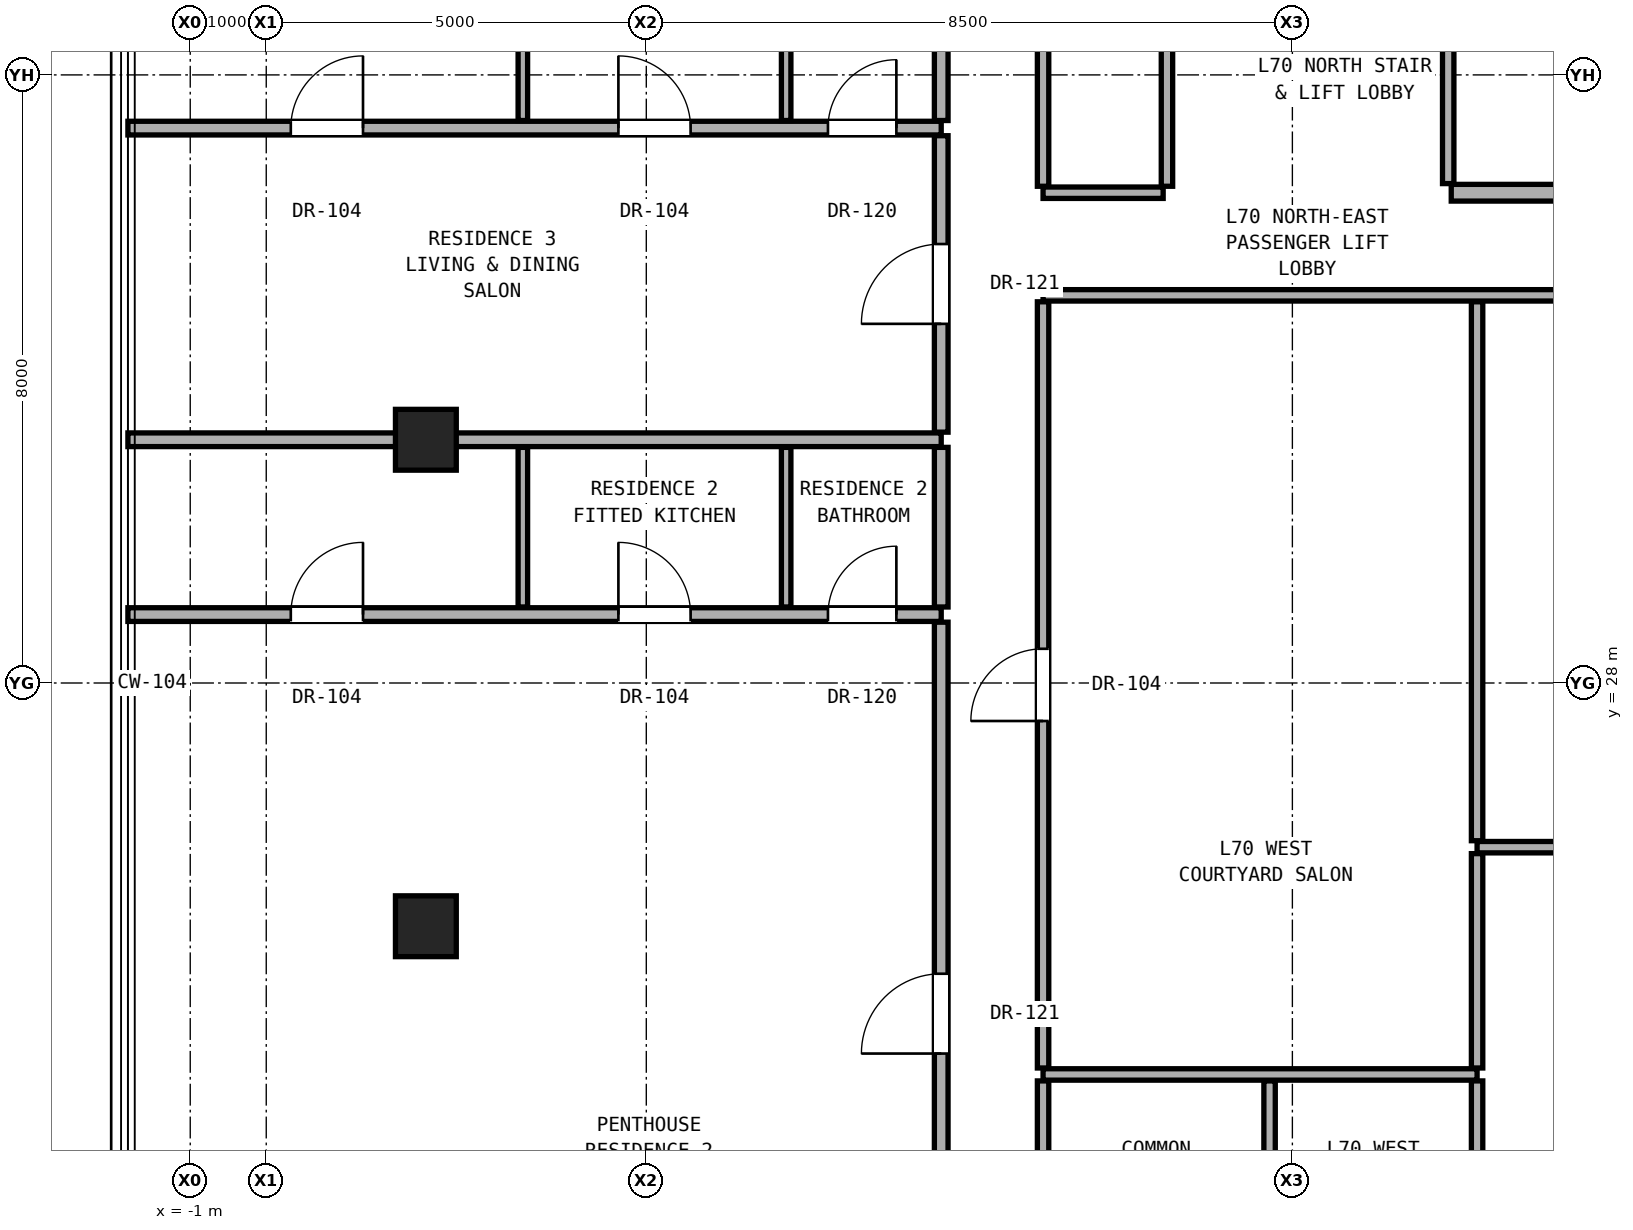
"""IFC4 building model, lengths in metres.
Left out: names, types, materials, properties, quantities, classifications, styles, units other than length and angle.
Written with IfcOpenShell. Run it as: python <this file> out.ifc"""

import sys

from ifc_helpers import new_model, si_unit, direction, frame, frame_2d, origin, origin_2d, place, context, subcontext, project, spatial, rectangle, hollow_rectangle, extrude, element, fill, save


model = new_model("IFC4")
c1 = context("Model", 3, precision=1e-05, world=origin(), true_north=direction((0.0, 1.0)))
c2 = subcontext(c1, "Body", "Model", "MODEL_VIEW")
j1 = project(units=[si_unit("LENGTHUNIT", "METRE"), si_unit("PLANEANGLEUNIT", "RADIAN")], contexts=[c1])
p1 = place(None, origin())
s1 = spatial("IfcSite", under=j1, at=p1, CompositionType="ELEMENT")
p2 = place(p1, origin())
s2 = spatial("IfcBuilding", under=s1, at=p2, CompositionType="ELEMENT")
p3 = place(p2, frame((0.0, 0.0, 245.8)))
s3 = spatial("IfcBuildingStorey", under=s2, at=p3, CompositionType="ELEMENT", Elevation=245.8)
for number, where, z_axis, x_axis in (
    (1, (2.1, 24.8, 0.0), (0.0, 0.0, 1.0), (1.0, 0.0, 0.0)),
    (2, (2.1, 31.2, 0.0), (0.0, 0.0, 1.0), (1.0, 0.0, 0.0)),
):
    element("IfcColumn", number, at=place(p3, frame(where, z_axis=z_axis, x_axis=x_axis)), inside=s3, PredefinedType="COLUMN", context=c2, shape_type="SweptSolid", body=[
        extrude(hollow_rectangle(XDim=0.8, YDim=0.8, WallThickness=0.045, at=origin_2d()), origin(), (0.0, 0.0, 1.0), 3.3),
    ])
p4 = place(p3, frame((10.22, 22.85, 0.0), z_axis=(0.0, 0.0, 1.0), x_axis=(1.0, 0.0, 0.0)))
e3 = element("IfcWall", 3, at=p4, inside=s3, PredefinedType="PARTITIONING", context=c2, shape_type="SweptSolid", body=[
    extrude(rectangle(XDim=5.71, YDim=0.15, at=frame_2d((2.855, 0.0))), origin(), (0.0, 0.0, 1.0), 2.236),
])
p5 = place(p3, frame((15.93, 25.84, 0.0), z_axis=(0.0, 0.0, 1.0), x_axis=(1.0, 0.0, 0.0)))
e4 = element("IfcWall", 4, at=p5, inside=s3, PredefinedType="PARTITIONING", context=c2, shape_type="SweptSolid", body=[
    extrude(rectangle(XDim=14.85, YDim=0.15, at=frame_2d((7.425, 0.0))), origin(), (0.0, 0.0, 1.0), 2.236),
])
p6 = place(p3, frame((-1.82, 28.9, 0.0), z_axis=(0.0, 0.0, 1.0), x_axis=(1.0, 0.0, 0.0)))
e5 = element("IfcWall", 5, at=p6, inside=s3, PredefinedType="PARTITIONING", context=c2, shape_type="SweptSolid", body=[
    extrude(rectangle(XDim=10.7, YDim=0.18, at=frame_2d((5.35, 0.0))), origin(), (0.0, 0.0, 1.0), 2.319),
])
p7 = place(p6, frame((2.143, 0.0, 0.0)))
e6 = element("IfcOpeningElement", 6, at=p7, cuts=e5, PredefinedType="OPENING", context=c2, shape_type="SweptSolid", body=[
    extrude(rectangle(XDim=0.95, YDim=2.15, at=frame_2d((0.475, 1.075))), frame((0.0, 0.1, 0.0), z_axis=(0.0, -1.0, 0.0), x_axis=(1.0, 0.0, 0.0)), (0.0, 0.0, 1.0), 0.2),
])
p8 = place(p6, frame((6.453, 0.0, 0.0)))
e7 = element("IfcOpeningElement", 7, at=p8, cuts=e5, PredefinedType="OPENING", context=c2, shape_type="SweptSolid", body=[
    extrude(rectangle(XDim=0.95, YDim=2.15, at=frame_2d((0.475, 1.075))), frame((0.0, 0.1, 0.0), z_axis=(0.0, -1.0, 0.0), x_axis=(1.0, 0.0, 0.0)), (0.0, 0.0, 1.0), 0.2),
])
p9 = place(p6, frame((9.21, 0.0, 0.0)))
e8 = element("IfcOpeningElement", 8, at=p9, cuts=e5, PredefinedType="OPENING", context=c2, shape_type="SweptSolid", body=[
    extrude(rectangle(XDim=0.9, YDim=2.1, at=frame_2d((0.45, 1.05))), frame((0.0, 0.1, 0.0), z_axis=(0.0, -1.0, 0.0), x_axis=(1.0, 0.0, 0.0)), (0.0, 0.0, 1.0), 0.2),
])
p10 = place(p3, frame((-1.82, 31.2, 0.0), z_axis=(0.0, 0.0, 1.0), x_axis=(1.0, 0.0, 0.0)))
e9 = element("IfcWall", 9, at=p10, inside=s3, PredefinedType="PARTITIONING", context=c2, shape_type="SweptSolid", body=[
    extrude(rectangle(XDim=10.7, YDim=0.18, at=frame_2d((5.35, 0.0))), origin(), (0.0, 0.0, 1.0), 2.319),
])
p11 = place(p3, frame((10.22, 33.1, 0.0), z_axis=(0.0, 0.0, 1.0), x_axis=(1.0, 0.0, 0.0)))
e10 = element("IfcWall", 10, at=p11, inside=s3, PredefinedType="PARTITIONING", context=c2, shape_type="SweptSolid", body=[
    extrude(rectangle(XDim=20.56, YDim=0.15, at=frame_2d((10.28, 0.0))), origin(), (0.0, 0.0, 1.0), 2.236),
])
p12 = place(p11, frame((9.343, 0.0, 0.0)))
e11 = element("IfcOpeningElement", 11, at=p12, cuts=e10, PredefinedType="OPENING", context=c2, shape_type="SweptSolid", body=[
    extrude(rectangle(XDim=1.05, YDim=2.2, at=frame_2d((0.525, 1.1))), frame((0.0, 0.085, 0.0), z_axis=(0.0, -1.0, 0.0), x_axis=(1.0, 0.0, 0.0)), (0.0, 0.0, 1.0), 0.17),
])
p13 = place(p11, frame((16.748, 0.0, 0.0)))
e12 = element("IfcOpeningElement", 12, at=p13, cuts=e10, PredefinedType="OPENING", context=c2, shape_type="SweptSolid", body=[
    extrude(rectangle(XDim=1.05, YDim=2.2, at=frame_2d((0.525, 1.1))), frame((0.0, 0.085, 0.0), z_axis=(0.0, -1.0, 0.0), x_axis=(1.0, 0.0, 0.0)), (0.0, 0.0, 1.0), 0.17),
])
p14 = place(p3, frame((10.22, 34.45, 0.0), z_axis=(0.0, 0.0, 1.0), x_axis=(1.0, 0.0, 0.0)))
e13 = element("IfcWall", 13, at=p14, inside=s3, PredefinedType="PARTITIONING", context=c2, shape_type="SweptSolid", body=[
    extrude(rectangle(XDim=1.58, YDim=0.15, at=frame_2d((0.79, 0.0))), origin(), (0.0, 0.0, 1.0), 2.236),
])
p15 = place(p3, frame((15.59, 34.45, 0.0), z_axis=(0.0, 0.0, 1.0), x_axis=(1.0, 0.0, 0.0)))
e14 = element("IfcWall", 14, at=p15, inside=s3, PredefinedType="SOLIDWALL", context=c2, shape_type="SweptSolid", body=[
    extrude(rectangle(XDim=15.19, YDim=0.22, at=frame_2d((7.595, 0.0))), origin(), (0.0, 0.0, 1.0), 2.236),
])
p16 = place(p15, frame((6.435, 0.0, 0.0)))
e15 = element("IfcOpeningElement", 15, at=p16, cuts=e14, PredefinedType="OPENING", context=c2, shape_type="SweptSolid", body=[
    extrude(rectangle(XDim=0.85, YDim=2.01, at=frame_2d((0.425, 1.005))), frame((0.0, 0.12, 0.0), z_axis=(0.0, -1.0, 0.0), x_axis=(1.0, 0.0, 0.0)), (0.0, 0.0, 1.0), 0.24),
])
p17 = place(p15, frame((11.085, 0.0, 0.0)))
e16 = element("IfcOpeningElement", 16, at=p17, cuts=e14, PredefinedType="OPENING", context=c2, shape_type="SweptSolid", body=[
    extrude(rectangle(XDim=0.95, YDim=2.15, at=frame_2d((0.475, 1.075))), frame((0.0, 0.12, 0.0), z_axis=(0.0, -1.0, 0.0), x_axis=(1.0, 0.0, 0.0)), (0.0, 0.0, 1.0), 0.24),
])
p18 = place(p15, frame((1.775, 0.0, 0.0)))
e17 = element("IfcOpeningElement", 17, at=p18, cuts=e14, PredefinedType="OPENING", context=c2, shape_type="SweptSolid", body=[
    extrude(rectangle(XDim=0.85, YDim=2.01, at=frame_2d((0.425, 1.005))), frame((0.0, 0.12, 0.0), z_axis=(0.0, -1.0, 0.0), x_axis=(1.0, 0.0, 0.0)), (0.0, 0.0, 1.0), 0.24),
])
p19 = place(p3, frame((-1.82, 35.3, 0.0), z_axis=(0.0, 0.0, 1.0), x_axis=(1.0, 0.0, 0.0)))
e18 = element("IfcWall", 18, at=p19, inside=s3, PredefinedType="PARTITIONING", context=c2, shape_type="SweptSolid", body=[
    extrude(rectangle(XDim=10.7, YDim=0.18, at=frame_2d((5.35, 0.0))), origin(), (0.0, 0.0, 1.0), 2.319),
])
p20 = place(p19, frame((2.143, 0.0, 0.0)))
e19 = element("IfcOpeningElement", 19, at=p20, cuts=e18, PredefinedType="OPENING", context=c2, shape_type="SweptSolid", body=[
    extrude(rectangle(XDim=0.95, YDim=2.15, at=frame_2d((0.475, 1.075))), frame((0.0, 0.1, 0.0), z_axis=(0.0, -1.0, 0.0), x_axis=(1.0, 0.0, 0.0)), (0.0, 0.0, 1.0), 0.2),
])
p21 = place(p19, frame((6.453, 0.0, 0.0)))
e20 = element("IfcOpeningElement", 20, at=p21, cuts=e18, PredefinedType="OPENING", context=c2, shape_type="SweptSolid", body=[
    extrude(rectangle(XDim=0.95, YDim=2.15, at=frame_2d((0.475, 1.075))), frame((0.0, 0.1, 0.0), z_axis=(0.0, -1.0, 0.0), x_axis=(1.0, 0.0, 0.0)), (0.0, 0.0, 1.0), 0.2),
])
p22 = place(p19, frame((9.21, 0.0, 0.0)))
e21 = element("IfcOpeningElement", 21, at=p22, cuts=e18, PredefinedType="OPENING", context=c2, shape_type="SweptSolid", body=[
    extrude(rectangle(XDim=0.9, YDim=2.1, at=frame_2d((0.45, 1.05))), frame((0.0, 0.1, 0.0), z_axis=(0.0, -1.0, 0.0), x_axis=(1.0, 0.0, 0.0)), (0.0, 0.0, 1.0), 0.2),
])
p23 = place(p3, frame((3.376, 29.0, 0.0), z_axis=(0.0, 0.0, 1.0), x_axis=(0.0, 1.0, 0.0)))
e22 = element("IfcWall", 22, at=p23, inside=s3, PredefinedType="PARTITIONING", context=c2, shape_type="SweptSolid", body=[
    extrude(rectangle(XDim=2.1, YDim=0.125, at=frame_2d((1.05, 0.0))), origin(), (0.0, 0.0, 1.0), 2.396),
])
p24 = place(p3, frame((3.376, 35.4, 0.0), z_axis=(0.0, 0.0, 1.0), x_axis=(0.0, 1.0, 0.0)))
e23 = element("IfcWall", 23, at=p24, inside=s3, PredefinedType="PARTITIONING", context=c2, shape_type="SweptSolid", body=[
    extrude(rectangle(XDim=2.1, YDim=0.125, at=frame_2d((1.05, 0.0))), origin(), (0.0, 0.0, 1.0), 2.492),
])
p25 = place(p3, frame((6.84, 29.0, 0.0), z_axis=(0.0, 0.0, 1.0), x_axis=(0.0, 1.0, 0.0)))
e24 = element("IfcWall", 24, at=p25, inside=s3, PredefinedType="PARTITIONING", context=c2, shape_type="SweptSolid", body=[
    extrude(rectangle(XDim=2.1, YDim=0.125, at=frame_2d((1.05, 0.0))), origin(), (0.0, 0.0, 1.0), 2.396),
])
p26 = place(p3, frame((6.84, 35.4, 0.0), z_axis=(0.0, 0.0, 1.0), x_axis=(0.0, 1.0, 0.0)))
e25 = element("IfcWall", 25, at=p26, inside=s3, PredefinedType="PARTITIONING", context=c2, shape_type="SweptSolid", body=[
    extrude(rectangle(XDim=2.1, YDim=0.125, at=frame_2d((1.05, 0.0))), origin(), (0.0, 0.0, 1.0), 2.492),
])
p27 = place(p3, frame((8.88, 18.5, 0.0), z_axis=(0.0, 0.0, 1.0), x_axis=(0.0, 1.0, 0.0)))
e26 = element("IfcWall", 26, at=p27, inside=s3, PredefinedType="PARTITIONING", context=c2, shape_type="SweptSolid", body=[
    extrude(rectangle(XDim=10.3, YDim=0.18, at=frame_2d((5.15, 0.0))), origin(), (0.0, 0.0, 1.0), 2.396),
])
p28 = place(p27, frame((4.625, 0.0, 0.0)))
e27 = element("IfcOpeningElement", 27, at=p28, cuts=e26, PredefinedType="OPENING", context=c2, shape_type="SweptSolid", body=[
    extrude(rectangle(XDim=1.05, YDim=2.2, at=frame_2d((0.525, 1.1))), frame((0.0, 0.1, 0.0), z_axis=(0.0, -1.0, 0.0), x_axis=(1.0, 0.0, 0.0)), (0.0, 0.0, 1.0), 0.2),
])
p29 = place(p3, frame((8.88, 29.0, 0.0), z_axis=(0.0, 0.0, 1.0), x_axis=(0.0, 1.0, 0.0)))
e28 = element("IfcWall", 28, at=p29, inside=s3, PredefinedType="PARTITIONING", context=c2, shape_type="SweptSolid", body=[
    extrude(rectangle(XDim=2.1, YDim=0.18, at=frame_2d((1.05, 0.0))), origin(), (0.0, 0.0, 1.0), 2.396),
])
p30 = place(p3, frame((8.88, 31.3, 0.0), z_axis=(0.0, 0.0, 1.0), x_axis=(0.0, 1.0, 0.0)))
e29 = element("IfcWall", 29, at=p30, inside=s3, PredefinedType="PARTITIONING", context=c2, shape_type="SweptSolid", body=[
    extrude(rectangle(XDim=3.9, YDim=0.18, at=frame_2d((1.95, 0.0))), origin(), (0.0, 0.0, 1.0), 2.396),
])
p31 = place(p30, frame((1.425, 0.0, 0.0)))
e30 = element("IfcOpeningElement", 30, at=p31, cuts=e29, PredefinedType="OPENING", context=c2, shape_type="SweptSolid", body=[
    extrude(rectangle(XDim=1.05, YDim=2.2, at=frame_2d((0.525, 1.1))), frame((0.0, 0.1, 0.0), z_axis=(0.0, -1.0, 0.0), x_axis=(1.0, 0.0, 0.0)), (0.0, 0.0, 1.0), 0.2),
])
p32 = place(p3, frame((8.88, 35.4, 0.0), z_axis=(0.0, 0.0, 1.0), x_axis=(0.0, 1.0, 0.0)))
e31 = element("IfcWall", 31, at=p32, inside=s3, PredefinedType="PARTITIONING", context=c2, shape_type="SweptSolid", body=[
    extrude(rectangle(XDim=2.1, YDim=0.18, at=frame_2d((1.05, 0.0))), origin(), (0.0, 0.0, 1.0), 2.492),
])
p33 = place(p3, frame((10.22, 19.985, 0.0), z_axis=(0.0, 0.0, 1.0), x_axis=(0.0, 1.0, 0.0)))
e32 = element("IfcWall", 32, at=p33, inside=s3, PredefinedType="PARTITIONING", context=c2, shape_type="SweptSolid", body=[
    extrude(rectangle(XDim=2.78, YDim=0.15, at=frame_2d((1.39, 0.0))), origin(), (0.0, 0.0, 1.0), 3.1),
])
p34 = place(p3, frame((10.22, 22.935, 0.0), z_axis=(0.0, 0.0, 1.0), x_axis=(0.0, 1.0, 0.0)))
e33 = element("IfcWall", 33, at=p34, inside=s3, PredefinedType="PARTITIONING", context=c2, shape_type="SweptSolid", body=[
    extrude(rectangle(XDim=10.08, YDim=0.15, at=frame_2d((5.04, 0.0))), origin(), (0.0, 0.0, 1.0), 2.396),
])
p35 = place(p34, frame((4.565, 0.0, 0.0)))
e34 = element("IfcOpeningElement", 34, at=p35, cuts=e33, PredefinedType="OPENING", context=c2, shape_type="SweptSolid", body=[
    extrude(rectangle(XDim=0.95, YDim=2.15, at=frame_2d((0.475, 1.075))), frame((0.0, 0.085, 0.0), z_axis=(0.0, -1.0, 0.0), x_axis=(1.0, 0.0, 0.0)), (0.0, 0.0, 1.0), 0.17),
])
p36 = place(p3, frame((10.22, 34.535, 0.0), z_axis=(0.0, 0.0, 1.0), x_axis=(0.0, 1.0, 0.0)))
e35 = element("IfcWall", 35, at=p36, inside=s3, PredefinedType="PARTITIONING", context=c2, shape_type="SweptSolid", body=[
    extrude(rectangle(XDim=9.13, YDim=0.15, at=frame_2d((4.565, 0.0))), origin(), (0.0, 0.0, 1.0), 2.492),
])
p37 = place(p3, frame((11.85, 34.535, 0.0), z_axis=(0.0, 0.0, 1.0), x_axis=(0.0, 1.0, 0.0)))
e36 = element("IfcWall", 36, at=p37, inside=s3, PredefinedType="PARTITIONING", context=c2, shape_type="SweptSolid", body=[
    extrude(rectangle(XDim=2.845, YDim=0.15, at=frame_2d((1.422, 0.0))), origin(), (0.0, 0.0, 1.0), 3.1),
])
p38 = place(p3, frame((13.2, 19.985, 0.0), z_axis=(0.0, 0.0, 1.0), x_axis=(0.0, 1.0, 0.0)))
e37 = element("IfcWall", 37, at=p38, inside=s3, PredefinedType="PARTITIONING", context=c2, shape_type="SweptSolid", body=[
    extrude(rectangle(XDim=2.78, YDim=0.15, at=frame_2d((1.39, 0.0))), origin(), (0.0, 0.0, 1.0), 3.1),
])
p39 = place(p3, frame((15.55, 34.57, 0.0), z_axis=(0.0, 0.0, 1.0), x_axis=(0.0, 1.0, 0.0)))
e38 = element("IfcWall", 38, at=p39, inside=s3, PredefinedType="PARTITIONING", context=c2, shape_type="SweptSolid", body=[
    extrude(rectangle(XDim=2.81, YDim=0.15, at=frame_2d((1.405, 0.0))), origin(), (0.0, 0.0, 1.0), 3.1),
])
p40 = place(p3, frame((15.93, 19.985, 0.0), z_axis=(0.0, 0.0, 1.0), x_axis=(0.0, 1.0, 0.0)))
e39 = element("IfcWall", 39, at=p40, inside=s3, PredefinedType="PARTITIONING", context=c2, shape_type="SweptSolid", body=[
    extrude(rectangle(XDim=2.78, YDim=0.15, at=frame_2d((1.39, 0.0))), origin(), (0.0, 0.0, 1.0), 3.1),
])
p41 = place(p3, frame((15.93, 22.935, 0.0), z_axis=(0.0, 0.0, 1.0), x_axis=(0.0, 1.0, 0.0)))
e40 = element("IfcWall", 40, at=p41, inside=s3, PredefinedType="PARTITIONING", context=c2, shape_type="SweptSolid", body=[
    extrude(rectangle(XDim=2.82, YDim=0.15, at=frame_2d((1.41, 0.0))), origin(), (0.0, 0.0, 1.0), 2.236),
])
p42 = place(p3, frame((15.93, 25.925, 0.0), z_axis=(0.0, 0.0, 1.0), x_axis=(0.0, 1.0, 0.0)))
e41 = element("IfcWall", 41, at=p42, inside=s3, PredefinedType="PARTITIONING", context=c2, shape_type="SweptSolid", body=[
    extrude(rectangle(XDim=7.09, YDim=0.15, at=frame_2d((3.545, 0.0))), origin(), (0.0, 0.0, 1.0), 2.236),
])
p43 = place(p28, origin())
e42 = element("IfcDoor", 42, at=p43, inside=s3, OperationType="SINGLE_SWING_LEFT", PredefinedType="DOOR", context=c2, shape_type="SweptSolid", body=[
    extrude(rectangle(XDim=1.05, YDim=2.2, at=frame_2d((0.525, 1.1))), frame((0.0, 0.025, 0.0), z_axis=(0.0, -1.0, 0.0), x_axis=(1.0, 0.0, 0.0)), (0.0, 0.0, 1.0), 0.05),
])
fill(e27, e42)
p44 = place(p7, origin())
e43 = element("IfcDoor", 43, at=p44, inside=s3, OperationType="SINGLE_SWING_RIGHT", PredefinedType="DOOR", context=c2, shape_type="SweptSolid", body=[
    extrude(rectangle(XDim=0.95, YDim=2.15, at=frame_2d((0.475, 1.075))), frame((0.0, 0.025, 0.0), z_axis=(0.0, -1.0, 0.0), x_axis=(1.0, 0.0, 0.0)), (0.0, 0.0, 1.0), 0.05),
])
fill(e6, e43)
p45 = place(p8, origin())
e44 = element("IfcDoor", 44, at=p45, inside=s3, OperationType="SINGLE_SWING_LEFT", PredefinedType="DOOR", context=c2, shape_type="SweptSolid", body=[
    extrude(rectangle(XDim=0.95, YDim=2.15, at=frame_2d((0.475, 1.075))), frame((0.0, 0.025, 0.0), z_axis=(0.0, -1.0, 0.0), x_axis=(1.0, 0.0, 0.0)), (0.0, 0.0, 1.0), 0.05),
])
fill(e7, e44)
p46 = place(p9, origin())
e45 = element("IfcDoor", 45, at=p46, inside=s3, OperationType="SINGLE_SWING_RIGHT", PredefinedType="DOOR", context=c2, shape_type="SweptSolid", body=[
    extrude(rectangle(XDim=0.9, YDim=2.1, at=frame_2d((0.45, 1.05))), frame((0.0, 0.025, 0.0), z_axis=(0.0, -1.0, 0.0), x_axis=(1.0, 0.0, 0.0)), (0.0, 0.0, 1.0), 0.05),
])
fill(e8, e45)
p47 = place(p31, origin())
e46 = element("IfcDoor", 46, at=p47, inside=s3, OperationType="SINGLE_SWING_LEFT", PredefinedType="DOOR", context=c2, shape_type="SweptSolid", body=[
    extrude(rectangle(XDim=1.05, YDim=2.2, at=frame_2d((0.525, 1.1))), frame((0.0, 0.025, 0.0), z_axis=(0.0, -1.0, 0.0), x_axis=(1.0, 0.0, 0.0)), (0.0, 0.0, 1.0), 0.05),
])
fill(e30, e46)
p48 = place(p20, origin())
e47 = element("IfcDoor", 47, at=p48, inside=s3, OperationType="SINGLE_SWING_RIGHT", PredefinedType="DOOR", context=c2, shape_type="SweptSolid", body=[
    extrude(rectangle(XDim=0.95, YDim=2.15, at=frame_2d((0.475, 1.075))), frame((0.0, 0.025, 0.0), z_axis=(0.0, -1.0, 0.0), x_axis=(1.0, 0.0, 0.0)), (0.0, 0.0, 1.0), 0.05),
])
fill(e19, e47)
p49 = place(p21, origin())
e48 = element("IfcDoor", 48, at=p49, inside=s3, OperationType="SINGLE_SWING_LEFT", PredefinedType="DOOR", context=c2, shape_type="SweptSolid", body=[
    extrude(rectangle(XDim=0.95, YDim=2.15, at=frame_2d((0.475, 1.075))), frame((0.0, 0.025, 0.0), z_axis=(0.0, -1.0, 0.0), x_axis=(1.0, 0.0, 0.0)), (0.0, 0.0, 1.0), 0.05),
])
fill(e20, e48)
p50 = place(p22, origin())
e49 = element("IfcDoor", 49, at=p50, inside=s3, OperationType="SINGLE_SWING_RIGHT", PredefinedType="DOOR", context=c2, shape_type="SweptSolid", body=[
    extrude(rectangle(XDim=0.9, YDim=2.1, at=frame_2d((0.45, 1.05))), frame((0.0, 0.025, 0.0), z_axis=(0.0, -1.0, 0.0), x_axis=(1.0, 0.0, 0.0)), (0.0, 0.0, 1.0), 0.05),
])
fill(e21, e49)
p51 = place(p35, origin())
e50 = element("IfcDoor", 50, at=p51, inside=s3, OperationType="SINGLE_SWING_LEFT", PredefinedType="DOOR", context=c2, shape_type="SweptSolid", body=[
    extrude(rectangle(XDim=0.95, YDim=2.15, at=frame_2d((0.475, 1.075))), frame((0.0, 0.025, 0.0), z_axis=(0.0, -1.0, 0.0), x_axis=(1.0, 0.0, 0.0)), (0.0, 0.0, 1.0), 0.05),
])
fill(e34, e50)
save(model, sys.argv[1])
